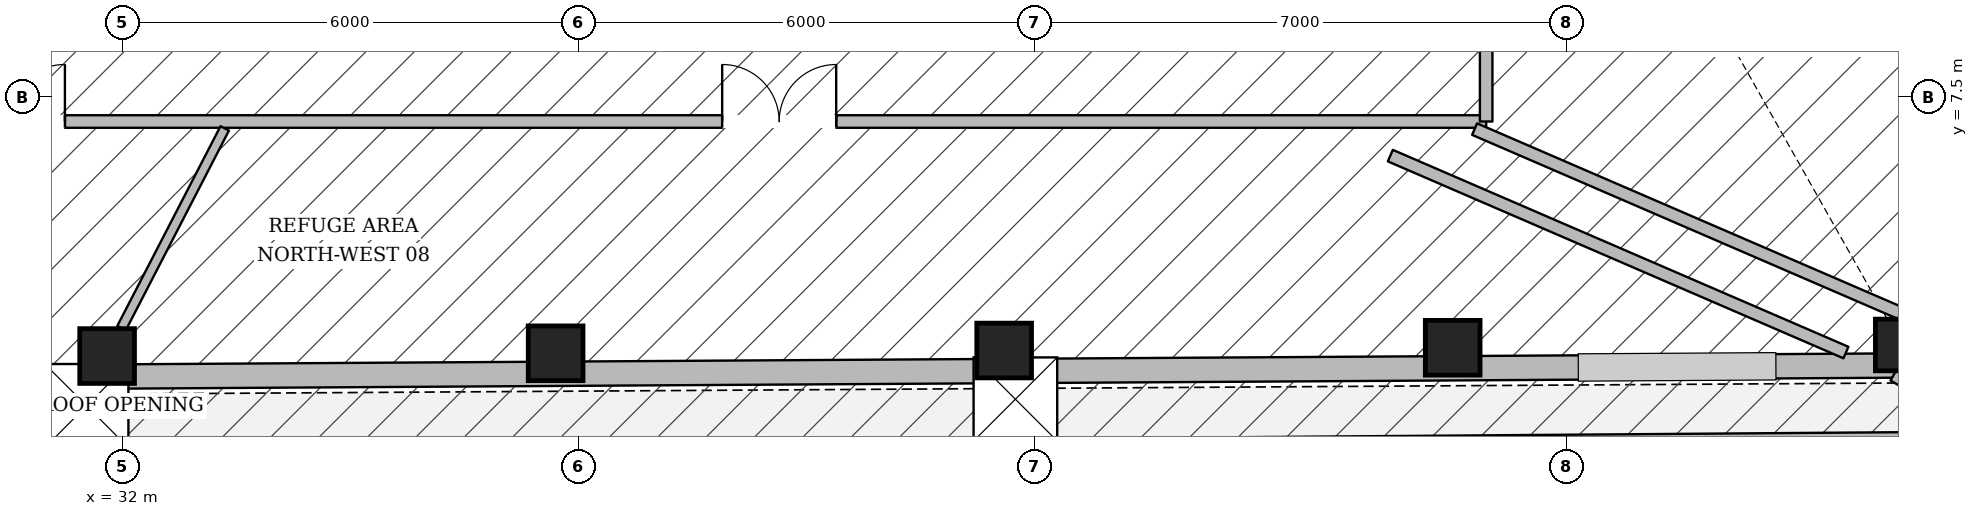
"""IFC4 building model, lengths in metres.
Left out: names, types, materials, properties, quantities, classifications, styles, units other than length and angle.
Written with IfcOpenShell. Run it as: python <this file> out.ifc"""

import sys

from ifc_helpers import new_model, si_unit, direction, frame, frame_2d, origin, origin_2d, place, context, subcontext, project, spatial, rectangle, hollow_rectangle, extrude, element, fill, save


model = new_model("IFC4")
c1 = context("Model", 3, precision=1e-05, world=origin(), true_north=direction((0.0, 1.0)))
c2 = subcontext(c1, "Body", "Model", "MODEL_VIEW")
j1 = project(units=[si_unit("LENGTHUNIT", "METRE"), si_unit("PLANEANGLEUNIT", "RADIAN")], contexts=[c1])
p1 = place(None, origin())
s1 = spatial("IfcSite", under=j1, at=p1, CompositionType="ELEMENT")
p2 = place(p1, origin())
s2 = spatial("IfcBuilding", under=s1, at=p2, CompositionType="ELEMENT")
p3 = place(p2, frame((0.0, 0.0, 154.8)))
s3 = spatial("IfcBuildingStorey", under=s2, at=p3, CompositionType="ELEMENT", Elevation=154.8)
for number, where, z_axis, x_axis in (
    (1, (31.797, 4.094, 0.0), (0.0, 0.0, 1.0), (1.0, 0.0, 0.0)),
    (2, (37.698, 4.131, 0.0), (0.0, 0.0, 1.0), (1.0, 0.0, 0.0)),
    (3, (43.599, 4.167, 0.0), (0.0, 0.0, 1.0), (1.0, 0.0, 0.0)),
    (4, (49.5, 4.204, 0.0), (0.0, 0.0, 1.0), (1.0, 0.0, 0.0)),
):
    element("IfcColumn", number, at=place(p3, frame(where, z_axis=z_axis, x_axis=x_axis)), inside=s3, PredefinedType="COLUMN", context=c2, shape_type="SweptSolid", body=[
        extrude(hollow_rectangle(XDim=0.72, YDim=0.72, WallThickness=0.032, at=origin_2d()), origin(), (0.0, 0.0, 1.0), 4.985),
    ])
p4 = place(p3, frame((55.401, 4.24, 0.0), z_axis=(0.0, 0.0, 1.0), x_axis=(1.0, 0.0, 0.0)))
e5 = element("IfcColumn", 5, at=p4, inside=s3, PredefinedType="COLUMN", context=c2, shape_type="SweptSolid", body=[
    extrude(hollow_rectangle(XDim=0.68, YDim=0.68, WallThickness=0.03, at=origin_2d()), origin(), (0.0, 0.0, 1.0), 4.985),
])
p5 = place(p3, frame((55.878, 3.973, 0.0), z_axis=(0.0, 0.0, 1.0), x_axis=(-0.999981007106, -0.006163231827, 0.0)))
e6 = element("IfcWall", 6, at=p5, inside=s3, PredefinedType="STANDARD", context=c2, shape_type="SweptSolid", body=[
    extrude(rectangle(XDim=36.364, YDim=0.32, at=frame_2d((18.182, 0.0))), origin(), (0.0, 0.0, 1.0), 3.677),
])
p6 = place(p3, frame((60.82, 13.133, 0.0), z_axis=(0.0, 0.0, 1.0), x_axis=(-0.498074593496, -0.867134187605, 0.0)))
e7 = element("IfcWall", 7, at=p6, inside=s3, PredefinedType="STANDARD", context=c2, shape_type="SweptSolid", body=[
    extrude(rectangle(XDim=10.887, YDim=0.32, at=frame_2d((5.443, 0.0))), origin(), (0.0, 0.0, 1.0), 3.677),
])
p7 = place(p3, frame((18.605, 2.695, 0.0), z_axis=(0.0, 0.0, 1.0), x_axis=(0.999971463124, 0.007554663279, 0.0)))
e8 = element("IfcWall", 8, at=p7, inside=s3, PredefinedType="PARAPET", context=c2, shape_type="SweptSolid", body=[
    extrude(rectangle(XDim=38.004, YDim=0.24, at=frame_2d((19.002, 0.0))), origin(), (0.0, 0.0, 1.0), 1.25),
])
p8 = place(p3, frame((26.06, 7.18, 0.0), z_axis=(0.0, 0.0, 1.0), x_axis=(1.0, 0.0, 0.0)))
e9 = element("IfcWall", 9, at=p8, inside=s3, PredefinedType="PARTITIONING", context=c2, shape_type="SweptSolid", body=[
    extrude(rectangle(XDim=23.88, YDim=0.165, at=frame_2d((11.94, 0.0))), origin(), (0.0, 0.0, 1.0), 2.825),
])
p9 = place(p8, frame((3.682, 0.0, 0.0)))
e10 = element("IfcOpeningElement", 10, at=p9, cuts=e9, PredefinedType="OPENING", context=c2, shape_type="SweptSolid", body=[
    extrude(rectangle(XDim=1.5, YDim=2.25, at=frame_2d((0.75, 1.125))), frame((0.0, 0.093, 0.0), z_axis=(0.0, -1.0, 0.0), x_axis=(1.0, 0.0, 0.0)), (0.0, 0.0, 1.0), 0.185),
])
p10 = place(p8, frame((13.829, 0.0, 0.0)))
e11 = element("IfcOpeningElement", 11, at=p10, cuts=e9, PredefinedType="OPENING", context=c2, shape_type="SweptSolid", body=[
    extrude(rectangle(XDim=1.5, YDim=2.25, at=frame_2d((0.75, 1.125))), frame((0.0, 0.093, 0.0), z_axis=(0.0, -1.0, 0.0), x_axis=(1.0, 0.0, 0.0)), (0.0, 0.0, 1.0), 0.185),
])
p11 = place(p3, frame((49.94, 7.18, 0.0), z_axis=(0.0, 0.0, 1.0), x_axis=(0.0, 1.0, 0.0)))
e12 = element("IfcWall", 12, at=p11, inside=s3, PredefinedType="PARTITIONING", context=c2, shape_type="SweptSolid", body=[
    extrude(rectangle(XDim=17.84, YDim=0.165, at=frame_2d((8.92, 0.0))), origin(), (0.0, 0.0, 1.0), 4.673),
])
p12 = place(p11, frame((8.355, 0.0, 0.0)))
e13 = element("IfcOpeningElement", 13, at=p12, cuts=e12, PredefinedType="OPENING", context=c2, shape_type="SweptSolid", body=[
    extrude(rectangle(XDim=1.5, YDim=2.25, at=frame_2d((0.75, 1.125))), frame((0.0, 0.093, 0.0), z_axis=(0.0, -1.0, 0.0), x_axis=(1.0, 0.0, 0.0)), (0.0, 0.0, 1.0), 0.185),
])
p13 = place(p11, frame((1.067, 0.0, 0.0)))
e14 = element("IfcOpeningElement", 14, at=p13, cuts=e12, PredefinedType="OPENING", context=c2, shape_type="SweptSolid", body=[
    extrude(rectangle(XDim=1.5, YDim=2.25, at=frame_2d((0.75, 1.125))), frame((0.0, 0.093, 0.0), z_axis=(0.0, -1.0, 0.0), x_axis=(1.0, 0.0, 0.0)), (0.0, 0.0, 1.0), 0.185),
])
p14 = place(p3, frame((49.788, 7.08, 0.0), z_axis=(0.0, 0.0, 1.0), x_axis=(0.917914325814, -0.396778641645, 0.0)))
e15 = element("IfcWall", 15, at=p14, inside=s3, PredefinedType="PARTITIONING", context=c2, shape_type="SweptSolid", body=[
    extrude(rectangle(XDim=6.251, YDim=0.165, at=frame_2d((3.125, 0.0))), origin(), (0.0, 0.0, 1.0), 4.985),
])
p15 = place(p3, frame((48.679, 6.731, 0.0), z_axis=(0.0, 0.0, 1.0), x_axis=(0.917920342818, -0.396764721518, 0.0)))
e16 = element("IfcWall", 16, at=p15, inside=s3, PredefinedType="PARTITIONING", context=c2, shape_type="SweptSolid", body=[
    extrude(rectangle(XDim=6.53, YDim=0.165, at=frame_2d((3.265, 0.0))), origin(), (0.0, 0.0, 1.0), 3.68),
])
p16 = place(p3, frame((33.344, 7.09, 0.0), z_axis=(0.0, 0.0, 1.0), x_axis=(-0.459029826467, -0.888420856584, 0.0)))
e17 = element("IfcWall", 17, at=p16, inside=s3, PredefinedType="PARTITIONING", context=c2, shape_type="SweptSolid", body=[
    extrude(rectangle(XDim=2.957, YDim=0.125, at=frame_2d((1.479, 0.0))), origin(), (0.0, 0.0, 1.0), 3.68),
])
p17 = place(p3, frame((0.0, 0.0, -0.22)))
p18 = place(p17, frame((31.527, 3.439, 0.0)))
p19 = place(p18, frame((0.0, 0.0, 0.17)))
e18 = element("IfcWindow", 18, at=p19, inside=s3, PartitioningType="SINGLE_PANEL", PredefinedType="SKYLIGHT", context=c2, shape_type="SweptSolid", body=[
    extrude(rectangle(XDim=1.1, YDim=1.1, at=origin_2d()), origin(), (0.0, 0.0, 1.0), 0.05),
])
p20 = place(p17, frame((43.747, 3.527, 0.0)))
p21 = place(p20, frame((0.0, 0.0, 0.17)))
e19 = element("IfcWindow", 19, at=p21, inside=s3, PartitioningType="SINGLE_PANEL", PredefinedType="SKYLIGHT", context=c2, shape_type="SweptSolid", body=[
    extrude(rectangle(XDim=1.1, YDim=1.1, at=origin_2d()), origin(), (0.0, 0.0, 1.0), 0.05),
])
p22 = place(p9, origin())
e20 = element("IfcDoor", 20, at=p22, inside=s3, OperationType="DOUBLE_DOOR_SINGLE_SWING", PredefinedType="DOOR", context=c2, shape_type="SweptSolid", body=[
    extrude(rectangle(XDim=1.5, YDim=2.25, at=frame_2d((0.75, 1.125))), frame((0.0, 0.025, 0.0), z_axis=(0.0, -1.0, 0.0), x_axis=(1.0, 0.0, 0.0)), (0.0, 0.0, 1.0), 0.05),
])
fill(e10, e20)
p23 = place(p10, origin())
e21 = element("IfcDoor", 21, at=p23, inside=s3, OperationType="DOUBLE_DOOR_SINGLE_SWING", PredefinedType="DOOR", context=c2, shape_type="SweptSolid", body=[
    extrude(rectangle(XDim=1.5, YDim=2.25, at=frame_2d((0.75, 1.125))), frame((0.0, 0.025, 0.0), z_axis=(0.0, -1.0, 0.0), x_axis=(1.0, 0.0, 0.0)), (0.0, 0.0, 1.0), 0.05),
])
fill(e11, e21)
save(model, sys.argv[1])
